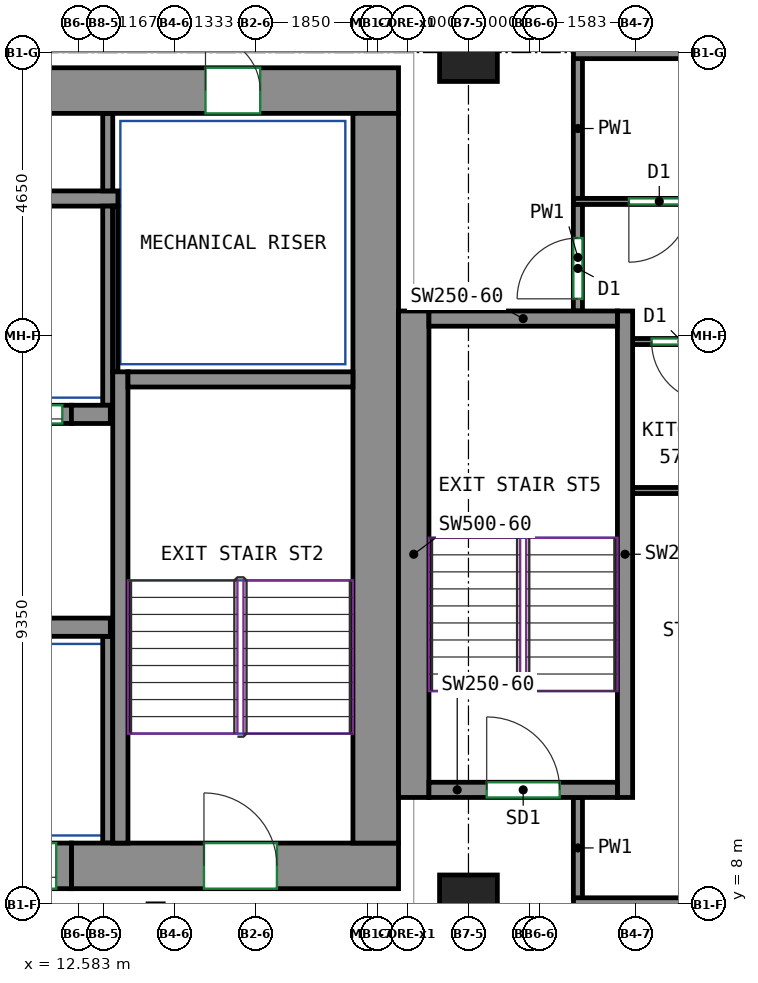
"""IFC4 building model, lengths in metres.
Left out: names, types, materials, properties, quantities, classifications, styles, units other than length and angle.
Written with IfcOpenShell. Run it as: python <this file> out.ifc"""

import sys

from ifc_helpers import new_model, si_unit, direction, frame, frame_2d, origin, origin_2d, place, context, subcontext, project, spatial, rectangle, extrude, source, transform, mapped, element, fill, save


model = new_model("IFC4")
c1 = context("Model", 3, precision=1e-05, world=origin(), true_north=direction((0.0, 1.0)))
c2 = subcontext(c1, "Body", "Model", "MODEL_VIEW")
j1 = project(units=[si_unit("LENGTHUNIT", "METRE"), si_unit("PLANEANGLEUNIT", "RADIAN")], contexts=[c1])
p1 = place(None, origin())
s1 = spatial("IfcSite", under=j1, at=p1, CompositionType="ELEMENT")
p2 = place(p1, origin())
s2 = spatial("IfcBuilding", under=s1, at=p2, CompositionType="ELEMENT")
p3 = place(p2, frame((0.0, 0.0, 239.0)))
s3 = spatial("IfcBuildingStorey", under=s2, at=p3, CompositionType="ELEMENT", Elevation=239.0)
m1 = source(origin(), c2, "Body", "SweptSolid", [
    extrude(rectangle(XDim=0.95, YDim=0.95, at=origin_2d()), origin(), (0.0, 0.0, 1.0), 3.12),
])
for number, where, z_axis, x_axis in (
    (1, (19.0, 8.0, 0.0), (0.0, 0.0, 1.0), (1.0, 0.0, 0.0)),
    (2, (19.0, 22.0, 0.0), (0.0, 0.0, 1.0), (1.0, 0.0, 0.0)),
):
    element("IfcColumn", number, at=place(p3, frame(where, z_axis=z_axis, x_axis=x_axis)), inside=s3, PredefinedType="COLUMN", context=c2, shape_type="MappedRepresentation", body=[
        mapped(m1, transform((0.0, 0.0, 0.0))),
    ])
m2 = source(origin(), c2, "Body", "SweptSolid", [
    extrude(rectangle(XDim=5.38, YDim=0.75, at=frame_2d((2.69, 0.0))), origin(), (0.0, 0.0, 1.0), 3.12),
])
p4 = place(p3, frame((12.47, 8.625, 0.0), z_axis=(0.0, 0.0, 1.0), x_axis=(1.0, 0.0, 0.0)))
e3 = element("IfcWall", 3, at=p4, inside=s3, PredefinedType="SHEAR", context=c2, shape_type="MappedRepresentation", body=[
    mapped(m2, transform((0.0, 0.0, 0.0))),
])
p5 = place(p4, frame((2.18, 0.0, 0.0)))
e4 = element("IfcOpeningElement", 4, at=p5, cuts=e3, PredefinedType="OPENING", context=c2, shape_type="SweptSolid", body=[
    extrude(rectangle(XDim=1.2, YDim=2.1, at=frame_2d((0.6, 1.05))), frame((0.0, 0.385, 0.0), z_axis=(0.0, -1.0, 0.0), x_axis=(1.0, 0.0, 0.0)), (0.0, 0.0, 1.0), 0.77),
])
m3 = source(origin(), c2, "Body", "SweptSolid", [
    extrude(rectangle(XDim=33.6, YDim=0.75, at=frame_2d((16.8, 0.0))), origin(), (0.0, 0.0, 1.0), 3.12),
])
p6 = place(p3, frame((-15.75, 21.375, 0.0), z_axis=(0.0, 0.0, 1.0), x_axis=(1.0, 0.0, 0.0)))
e5 = element("IfcWall", 5, at=p6, inside=s3, PredefinedType="SHEAR", context=c2, shape_type="MappedRepresentation", body=[
    mapped(m3, transform((0.0, 0.0, 0.0))),
])
p7 = place(p6, frame((8.27, 0.0, 0.0)))
e6 = element("IfcOpeningElement", 6, at=p7, cuts=e5, PredefinedType="OPENING", context=c2, shape_type="SweptSolid", body=[
    extrude(rectangle(XDim=0.9, YDim=2.1, at=frame_2d((0.45, 1.05))), frame((0.0, 0.385, 0.0), z_axis=(0.0, -1.0, 0.0), x_axis=(1.0, 0.0, 0.0)), (0.0, 0.0, 1.0), 0.77),
])
p8 = place(p6, frame((14.97, 0.0, 0.0)))
e7 = element("IfcOpeningElement", 7, at=p8, cuts=e5, PredefinedType="OPENING", context=c2, shape_type="SweptSolid", body=[
    extrude(rectangle(XDim=0.9, YDim=2.1, at=frame_2d((0.45, 1.05))), frame((0.0, 0.385, 0.0), z_axis=(0.0, -1.0, 0.0), x_axis=(1.0, 0.0, 0.0)), (0.0, 0.0, 1.0), 0.77),
])
p9 = place(p6, frame((19.794, 0.0, 0.0)))
e8 = element("IfcOpeningElement", 8, at=p9, cuts=e5, PredefinedType="OPENING", context=c2, shape_type="SweptSolid", body=[
    extrude(rectangle(XDim=0.9, YDim=2.1, at=frame_2d((0.45, 1.05))), frame((0.0, 0.385, 0.0), z_axis=(0.0, -1.0, 0.0), x_axis=(1.0, 0.0, 0.0)), (0.0, 0.0, 1.0), 0.77),
])
p10 = place(p6, frame((25.154, 0.0, 0.0)))
e9 = element("IfcOpeningElement", 9, at=p10, cuts=e5, PredefinedType="OPENING", context=c2, shape_type="SweptSolid", body=[
    extrude(rectangle(XDim=0.9, YDim=2.1, at=frame_2d((0.45, 1.05))), frame((0.0, 0.385, 0.0), z_axis=(0.0, -1.0, 0.0), x_axis=(1.0, 0.0, 0.0)), (0.0, 0.0, 1.0), 0.77),
])
p11 = place(p6, frame((2.275, 0.0, 0.0)))
e10 = element("IfcOpeningElement", 10, at=p11, cuts=e5, PredefinedType="OPENING", context=c2, shape_type="SweptSolid", body=[
    extrude(rectangle(XDim=0.9, YDim=2.1, at=frame_2d((0.45, 1.05))), frame((0.0, 0.385, 0.0), z_axis=(0.0, -1.0, 0.0), x_axis=(1.0, 0.0, 0.0)), (0.0, 0.0, 1.0), 0.77),
])
p12 = place(p6, frame((30.425, 0.0, 0.0)))
e11 = element("IfcOpeningElement", 11, at=p12, cuts=e5, PredefinedType="OPENING", context=c2, shape_type="SweptSolid", body=[
    extrude(rectangle(XDim=0.9, YDim=2.1, at=frame_2d((0.45, 1.05))), frame((0.0, 0.385, 0.0), z_axis=(0.0, -1.0, 0.0), x_axis=(1.0, 0.0, 0.0)), (0.0, 0.0, 1.0), 0.77),
])
m4 = source(origin(), c2, "Body", "SweptSolid", [
    extrude(rectangle(XDim=12.0, YDim=0.75, at=frame_2d((6.0, 0.0))), origin(), (0.0, 0.0, 1.0), 3.12),
])
p13 = place(p3, frame((17.475, 9.0, 0.0), z_axis=(0.0, 0.0, 1.0), x_axis=(0.0, 1.0, 0.0)))
e12 = element("IfcWall", 12, at=p13, inside=s3, PredefinedType="SHEAR", context=c2, shape_type="MappedRepresentation", body=[
    mapped(m4, transform((0.0, 0.0, 0.0))),
])
m5 = source(origin(), c2, "Body", "SweptSolid", [
    extrude(rectangle(XDim=7.75, YDim=0.25, at=frame_2d((3.875, 0.0))), origin(), (0.0, 0.0, 1.0), 3.12),
])
p14 = place(p3, frame((13.275, 9.0, 0.0), z_axis=(0.0, 0.0, 1.0), x_axis=(0.0, 1.0, 0.0)))
e13 = element("IfcWall", 13, at=p14, inside=s3, PredefinedType="SHEAR", context=c2, shape_type="MappedRepresentation", body=[
    mapped(m5, transform((0.0, 0.0, 0.0))),
])
m6 = source(origin(), c2, "Body", "SweptSolid", [
    extrude(rectangle(XDim=3.7, YDim=0.25, at=frame_2d((1.85, 0.0))), origin(), (0.0, 0.0, 1.0), 3.12),
])
p15 = place(p3, frame((13.4, 16.625, 0.0), z_axis=(0.0, 0.0, 1.0), x_axis=(1.0, 0.0, 0.0)))
e14 = element("IfcWall", 14, at=p15, inside=s3, PredefinedType="SHEAR", context=c2, shape_type="MappedRepresentation", body=[
    mapped(m6, transform((0.0, 0.0, 0.0))),
])
m7 = source(origin(), c2, "Body", "SweptSolid", [
    extrude(rectangle(XDim=8.0, YDim=0.5, at=frame_2d((4.0, 0.0))), origin(), (0.0, 0.0, 1.0), 3.12),
])
p16 = place(p3, frame((18.1, 9.75, 0.0), z_axis=(0.0, 0.0, 1.0), x_axis=(0.0, 1.0, 0.0)))
e15 = element("IfcWall", 15, at=p16, inside=s3, PredefinedType="SHEAR", context=c2, shape_type="MappedRepresentation", body=[
    mapped(m7, transform((0.0, 0.0, 0.0))),
])
m8 = source(origin(), c2, "Body", "SweptSolid", [
    extrude(rectangle(XDim=8.0, YDim=0.25, at=frame_2d((4.0, 0.0))), origin(), (0.0, 0.0, 1.0), 3.12),
])
p17 = place(p3, frame((21.575, 9.75, 0.0), z_axis=(0.0, 0.0, 1.0), x_axis=(0.0, 1.0, 0.0)))
e16 = element("IfcWall", 16, at=p17, inside=s3, PredefinedType="SHEAR", context=c2, shape_type="MappedRepresentation", body=[
    mapped(m8, transform((0.0, 0.0, 0.0))),
])
m9 = source(origin(), c2, "Body", "SweptSolid", [
    extrude(rectangle(XDim=3.1, YDim=0.25, at=frame_2d((1.55, 0.0))), origin(), (0.0, 0.0, 1.0), 3.12),
])
p18 = place(p3, frame((18.35, 9.875, 0.0), z_axis=(0.0, 0.0, 1.0), x_axis=(1.0, 0.0, 0.0)))
e17 = element("IfcWall", 17, at=p18, inside=s3, PredefinedType="SHEAR", context=c2, shape_type="MappedRepresentation", body=[
    mapped(m9, transform((0.0, 0.0, 0.0))),
])
p19 = place(p18, frame((0.95, 0.0, 0.0)))
e18 = element("IfcOpeningElement", 18, at=p19, cuts=e17, PredefinedType="OPENING", context=c2, shape_type="SweptSolid", body=[
    extrude(rectangle(XDim=1.2, YDim=2.1, at=frame_2d((0.6, 1.05))), frame((0.0, 0.135, 0.0), z_axis=(0.0, -1.0, 0.0), x_axis=(1.0, 0.0, 0.0)), (0.0, 0.0, 1.0), 0.27),
])
p20 = place(p3, frame((18.35, 17.625, 0.0), z_axis=(0.0, 0.0, 1.0), x_axis=(1.0, 0.0, 0.0)))
e19 = element("IfcWall", 19, at=p20, inside=s3, PredefinedType="SHEAR", context=c2, shape_type="MappedRepresentation", body=[
    mapped(m9, transform((0.0, 0.0, 0.0))),
])
m10 = source(origin(), c2, "Body", "SweptSolid", [
    extrude(rectangle(XDim=2.82, YDim=0.3, at=frame_2d((1.41, 0.0))), origin(), (0.0, 0.0, 1.0), 3.12),
])
p21 = place(p3, frame((10.29, 12.55, 0.0), z_axis=(0.0, 0.0, 1.0), x_axis=(1.0, 0.0, 0.0)))
e20 = element("IfcWall", 20, at=p21, inside=s3, PredefinedType="SHEAR", context=c2, shape_type="MappedRepresentation", body=[
    mapped(m10, transform((0.0, 0.0, 0.0))),
])
m11 = source(origin(), c2, "Body", "SweptSolid", [
    extrude(rectangle(XDim=0.64, YDim=0.3, at=frame_2d((0.32, 0.0))), origin(), (0.0, 0.0, 1.0), 3.12),
])
p22 = place(p3, frame((12.47, 16.05, 0.0), z_axis=(0.0, 0.0, 1.0), x_axis=(1.0, 0.0, 0.0)))
e21 = element("IfcWall", 21, at=p22, inside=s3, PredefinedType="SHEAR", context=c2, shape_type="MappedRepresentation", body=[
    mapped(m11, transform((0.0, 0.0, 0.0))),
])
m12 = source(origin(), c2, "Body", "SweptSolid", [
    extrude(rectangle(XDim=1.4, YDim=0.3, at=frame_2d((0.7, 0.0))), origin(), (0.0, 0.0, 1.0), 3.12),
])
p23 = place(p3, frame((11.07, 16.05, 0.0), z_axis=(0.0, 0.0, 1.0), x_axis=(1.0, 0.0, 0.0)))
e22 = element("IfcWall", 22, at=p23, inside=s3, PredefinedType="PARTITIONING", context=c2, shape_type="MappedRepresentation", body=[
    mapped(m12, transform((0.0, 0.0, 0.0))),
])
p24 = place(p23, frame((0.15, 0.0, 0.0)))
e23 = element("IfcOpeningElement", 23, at=p24, cuts=e22, PredefinedType="OPENING", context=c2, shape_type="SweptSolid", body=[
    extrude(rectangle(XDim=1.1, YDim=2.1, at=frame_2d((0.55, 1.05))), frame((0.0, 0.16, 0.0), z_axis=(0.0, -1.0, 0.0), x_axis=(1.0, 0.0, 0.0)), (0.0, 0.0, 1.0), 0.32),
])
m13 = source(origin(), c2, "Body", "SweptSolid", [
    extrude(rectangle(XDim=10.97, YDim=0.25, at=frame_2d((5.485, 0.0))), origin(), (0.0, 0.0, 1.0), 3.12),
])
p25 = place(p3, frame((2.265, 19.6, 0.0), z_axis=(0.0, 0.0, 1.0), x_axis=(1.0, 0.0, 0.0)))
e24 = element("IfcWall", 24, at=p25, inside=s3, PredefinedType="PARTITIONING", context=c2, shape_type="MappedRepresentation", body=[
    mapped(m13, transform((0.0, 0.0, 0.0))),
])
m14 = source(origin(), c2, "Body", "SweptSolid", [
    extrude(rectangle(XDim=3.275, YDim=0.165, at=frame_2d((1.638, 0.0))), origin(), (0.0, 0.0, 1.0), 3.12),
])
p26 = place(p3, frame((13.067, 16.2, 0.0), z_axis=(0.0, 0.0, 1.0), x_axis=(0.0, 1.0, 0.0)))
e25 = element("IfcWall", 25, at=p26, inside=s3, PredefinedType="PARTITIONING", context=c2, shape_type="MappedRepresentation", body=[
    mapped(m14, transform((0.0, 0.0, 0.0))),
])
m15 = source(origin(), c2, "Body", "SweptSolid", [
    extrude(rectangle(XDim=1.275, YDim=0.165, at=frame_2d((0.637, 0.0))), origin(), (0.0, 0.0, 1.0), 3.12),
])
p27 = place(p3, frame((13.067, 19.725, 0.0), z_axis=(0.0, 0.0, 1.0), x_axis=(0.0, 1.0, 0.0)))
e26 = element("IfcWall", 26, at=p27, inside=s3, PredefinedType="PARTITIONING", context=c2, shape_type="MappedRepresentation", body=[
    mapped(m15, transform((0.0, 0.0, 0.0))),
])
m16 = source(origin(), c2, "Body", "SweptSolid", [
    extrude(rectangle(XDim=2.725, YDim=0.085, at=frame_2d((1.363, 0.0))), origin(), (0.0, 0.0, 1.0), 3.12),
])
p28 = place(p3, frame((13.192, 16.75, 0.0), z_axis=(0.0, 0.0, 1.0), x_axis=(0.0, 1.0, 0.0)))
e27 = element("IfcWall", 27, at=p28, inside=s3, PredefinedType="PARTITIONING", context=c2, shape_type="MappedRepresentation", body=[
    mapped(m16, transform((0.0, 0.0, 0.0))),
])
m17 = source(origin(), c2, "Body", "SweptSolid", [
    extrude(rectangle(XDim=3.4, YDim=0.165, at=frame_2d((1.7, 0.0))), origin(), (0.0, 0.0, 1.0), 3.12),
])
p29 = place(p3, frame((13.067, 9.0, 0.0), z_axis=(0.0, 0.0, 1.0), x_axis=(0.0, 1.0, 0.0)))
e28 = element("IfcWall", 28, at=p29, inside=s3, PredefinedType="PARTITIONING", context=c2, shape_type="MappedRepresentation", body=[
    mapped(m17, transform((0.0, 0.0, 0.0))),
])
m18 = source(origin(), c2, "Body", "SweptSolid", [
    extrude(rectangle(XDim=1.4, YDim=0.75, at=frame_2d((0.7, 0.0))), origin(), (0.0, 0.0, 1.0), 2.7),
])
p30 = place(p3, frame((11.07, 8.625, 0.0), z_axis=(0.0, 0.0, 1.0), x_axis=(1.0, 0.0, 0.0)))
e29 = element("IfcWall", 29, at=p30, inside=s3, PredefinedType="PARTITIONING", context=c2, shape_type="MappedRepresentation", body=[
    mapped(m18, transform((0.0, 0.0, 0.0))),
])
p31 = place(p30, frame((0.25, 0.0, 0.0)))
e30 = element("IfcOpeningElement", 30, at=p31, cuts=e29, PredefinedType="OPENING", context=c2, shape_type="SweptSolid", body=[
    extrude(rectangle(XDim=0.9, YDim=2.1, at=frame_2d((0.45, 1.05))), frame((0.0, 0.385, 0.0), z_axis=(0.0, -1.0, 0.0), x_axis=(1.0, 0.0, 0.0)), (0.0, 0.0, 1.0), 0.77),
])
p32 = place(p3, frame((20.8, 8.09, 0.0), z_axis=(0.0, 0.0, 1.0), x_axis=(0.0, 1.0, 0.0)))
e31 = element("IfcWall", 31, at=p32, inside=s3, PredefinedType="PARTITIONING", context=c2, shape_type="SweptSolid", body=[
    extrude(rectangle(XDim=1.66, YDim=0.15, at=frame_2d((0.83, 0.0))), origin(), (0.0, 0.0, 1.0), 3.12),
])
p33 = place(p3, frame((20.8, 17.75, 0.0), z_axis=(0.0, 0.0, 1.0), x_axis=(0.0, 1.0, 0.0)))
e32 = element("IfcWall", 32, at=p33, inside=s3, PredefinedType="PARTITIONING", context=c2, shape_type="SweptSolid", body=[
    extrude(rectangle(XDim=1.762, YDim=0.15, at=frame_2d((0.881, 0.0))), origin(), (0.0, 0.0, 1.0), 3.12),
])
p34 = place(p33, frame((0.2, 0.0, 0.0)))
e33 = element("IfcOpeningElement", 33, at=p34, cuts=e32, PredefinedType="OPENING", context=c2, shape_type="SweptSolid", body=[
    extrude(rectangle(XDim=1.0, YDim=2.1, at=frame_2d((0.5, 1.05))), frame((0.0, 0.085, 0.0), z_axis=(0.0, -1.0, 0.0), x_axis=(1.0, 0.0, 0.0)), (0.0, 0.0, 1.0), 0.17),
])
p35 = place(p3, frame((20.8, 19.592, 0.0), z_axis=(0.0, 0.0, 1.0), x_axis=(0.0, 1.0, 0.0)))
e34 = element("IfcWall", 34, at=p35, inside=s3, PredefinedType="PARTITIONING", context=c2, shape_type="SweptSolid", body=[
    extrude(rectangle(XDim=2.318, YDim=0.15, at=frame_2d((1.159, 0.0))), origin(), (0.0, 0.0, 1.0), 3.12),
])
p36 = place(p3, frame((20.727, 8.0, 0.0), z_axis=(0.0, 0.0, 1.0), x_axis=(1.0, 0.0, 0.0)))
e35 = element("IfcWall", 35, at=p36, inside=s3, PredefinedType="PARTITIONING", context=c2, shape_type="SweptSolid", body=[
    extrude(rectangle(XDim=7.973, YDim=0.2, at=frame_2d((3.986, 0.0))), origin(), (0.0, 0.0, 1.0), 2.57),
])
p37 = place(p3, frame((23.501, 14.798, 0.0), z_axis=(0.0, 0.0, 1.0), x_axis=(-1.0, 0.0, 0.0)))
e36 = element("IfcWall", 36, at=p37, inside=s3, PredefinedType="PARTITIONING", context=c2, shape_type="SweptSolid", body=[
    extrude(rectangle(XDim=1.801, YDim=0.1, at=frame_2d((0.9, 0.0))), origin(), (0.0, 0.0, 1.0), 3.12),
])
p38 = place(p3, frame((23.55, 17.248, 0.0), z_axis=(0.0, 0.0, 1.0), x_axis=(-1.0, 0.0, 0.0)))
e37 = element("IfcWall", 37, at=p38, inside=s3, PredefinedType="PARTITIONING", context=c2, shape_type="SweptSolid", body=[
    extrude(rectangle(XDim=1.85, YDim=0.1, at=frame_2d((0.925, 0.0))), origin(), (0.0, 0.0, 1.0), 3.12),
])
p39 = place(p38, frame((0.538, 0.0, 0.0)))
e38 = element("IfcOpeningElement", 38, at=p39, cuts=e37, PredefinedType="OPENING", context=c2, shape_type="SweptSolid", body=[
    extrude(rectangle(XDim=1.0, YDim=2.1, at=frame_2d((0.5, 1.05))), frame((0.0, 0.06, 0.0), z_axis=(0.0, -1.0, 0.0), x_axis=(1.0, 0.0, 0.0)), (0.0, 0.0, 1.0), 0.12),
])
p40 = place(p3, frame((23.55, 19.552, 0.0), z_axis=(0.0, 0.0, 1.0), x_axis=(-1.0, 0.0, 0.0)))
e39 = element("IfcWall", 39, at=p40, inside=s3, PredefinedType="PARTITIONING", context=c2, shape_type="SweptSolid", body=[
    extrude(rectangle(XDim=2.823, YDim=0.1, at=frame_2d((1.412, 0.0))), origin(), (0.0, 0.0, 1.0), 3.12),
])
p41 = place(p40, frame((0.912, 0.0, 0.0)))
e40 = element("IfcOpeningElement", 40, at=p41, cuts=e39, PredefinedType="OPENING", context=c2, shape_type="SweptSolid", body=[
    extrude(rectangle(XDim=1.0, YDim=2.1, at=frame_2d((0.5, 1.05))), frame((0.0, 0.06, 0.0), z_axis=(0.0, -1.0, 0.0), x_axis=(1.0, 0.0, 0.0)), (0.0, 0.0, 1.0), 0.12),
])
p42 = place(p3, frame((20.727, 22.0, 0.0), z_axis=(0.0, 0.0, 1.0), x_axis=(1.0, 0.0, 0.0)))
e41 = element("IfcWall", 41, at=p42, inside=s3, PredefinedType="PARTITIONING", context=c2, shape_type="SweptSolid", body=[
    extrude(rectangle(XDim=7.973, YDim=0.2, at=frame_2d((3.986, 0.0))), origin(), (0.0, 0.0, 1.0), 2.57),
])
p43 = place(p31, origin())
e42 = element("IfcDoor", 42, at=p43, inside=s3, OperationType="SLIDING_TO_LEFT", PredefinedType="DOOR", context=c2, shape_type="SweptSolid", body=[
    extrude(rectangle(XDim=0.9, YDim=2.1, at=frame_2d((0.45, 1.05))), frame((0.0, 0.28, 0.0), z_axis=(0.0, -1.0, 0.0), x_axis=(1.0, 0.0, 0.0)), (0.0, 0.0, 1.0), 0.05),
])
fill(e30, e42)
p44 = place(p24, origin())
e43 = element("IfcDoor", 43, at=p44, inside=s3, OperationType="DOUBLE_DOOR_SLIDING", PredefinedType="DOOR", context=c2, shape_type="SweptSolid", body=[
    extrude(rectangle(XDim=1.1, YDim=2.1, at=frame_2d((0.55, 1.05))), frame((0.0, 0.025, 0.0), z_axis=(0.0, -1.0, 0.0), x_axis=(1.0, 0.0, 0.0)), (0.0, 0.0, 1.0), 0.05),
])
fill(e23, e43)
p45 = place(p12, origin())
e44 = element("IfcDoor", 44, at=p45, inside=s3, OperationType="SINGLE_SWING_LEFT", PredefinedType="DOOR", context=c2, shape_type="SweptSolid", body=[
    extrude(rectangle(XDim=0.9, YDim=2.1, at=frame_2d((0.45, 1.05))), frame((0.0, -0.23, 0.0), z_axis=(0.0, -1.0, 0.0), x_axis=(1.0, 0.0, 0.0)), (0.0, 0.0, 1.0), 0.05),
])
fill(e11, e44)
p46 = place(p5, origin())
e45 = element("IfcDoor", 45, at=p46, inside=s3, OperationType="DOUBLE_DOOR_SINGLE_SWING", PredefinedType="DOOR", context=c2, shape_type="SweptSolid", body=[
    extrude(rectangle(XDim=1.2, YDim=2.1, at=frame_2d((0.6, 1.05))), frame((0.0, 0.28, 0.0), z_axis=(0.0, -1.0, 0.0), x_axis=(1.0, 0.0, 0.0)), (0.0, 0.0, 1.0), 0.05),
])
fill(e4, e45)
p47 = place(p19, origin())
e46 = element("IfcDoor", 46, at=p47, inside=s3, OperationType="DOUBLE_DOOR_SINGLE_SWING", PredefinedType="DOOR", context=c2, shape_type="SweptSolid", body=[
    extrude(rectangle(XDim=1.2, YDim=2.1, at=frame_2d((0.6, 1.05))), frame((0.0, 0.025, 0.0), z_axis=(0.0, -1.0, 0.0), x_axis=(1.0, 0.0, 0.0)), (0.0, 0.0, 1.0), 0.05),
])
fill(e18, e46)
p48 = place(p39, origin())
e47 = element("IfcDoor", 47, at=p48, inside=s3, OperationType="SINGLE_SWING_LEFT", PredefinedType="DOOR", context=c2, shape_type="SweptSolid", body=[
    extrude(rectangle(XDim=1.0, YDim=2.1, at=frame_2d((0.5, 1.05))), frame((0.0, 0.025, 0.0), z_axis=(0.0, -1.0, 0.0), x_axis=(1.0, 0.0, 0.0)), (0.0, 0.0, 1.0), 0.05),
])
fill(e38, e47)
p49 = place(p34, origin())
e48 = element("IfcDoor", 48, at=p49, inside=s3, OperationType="SINGLE_SWING_LEFT", PredefinedType="DOOR", context=c2, shape_type="SweptSolid", body=[
    extrude(rectangle(XDim=1.0, YDim=2.1, at=frame_2d((0.5, 1.05))), frame((0.0, 0.025, 0.0), z_axis=(0.0, -1.0, 0.0), x_axis=(1.0, 0.0, 0.0)), (0.0, 0.0, 1.0), 0.05),
])
fill(e33, e48)
p50 = place(p41, origin())
e49 = element("IfcDoor", 49, at=p50, inside=s3, OperationType="SINGLE_SWING_RIGHT", PredefinedType="DOOR", context=c2, shape_type="SweptSolid", body=[
    extrude(rectangle(XDim=1.0, YDim=2.1, at=frame_2d((0.5, 1.05))), frame((0.0, 0.025, 0.0), z_axis=(0.0, -1.0, 0.0), x_axis=(1.0, 0.0, 0.0)), (0.0, 0.0, 1.0), 0.05),
])
fill(e40, e49)
save(model, sys.argv[1])
